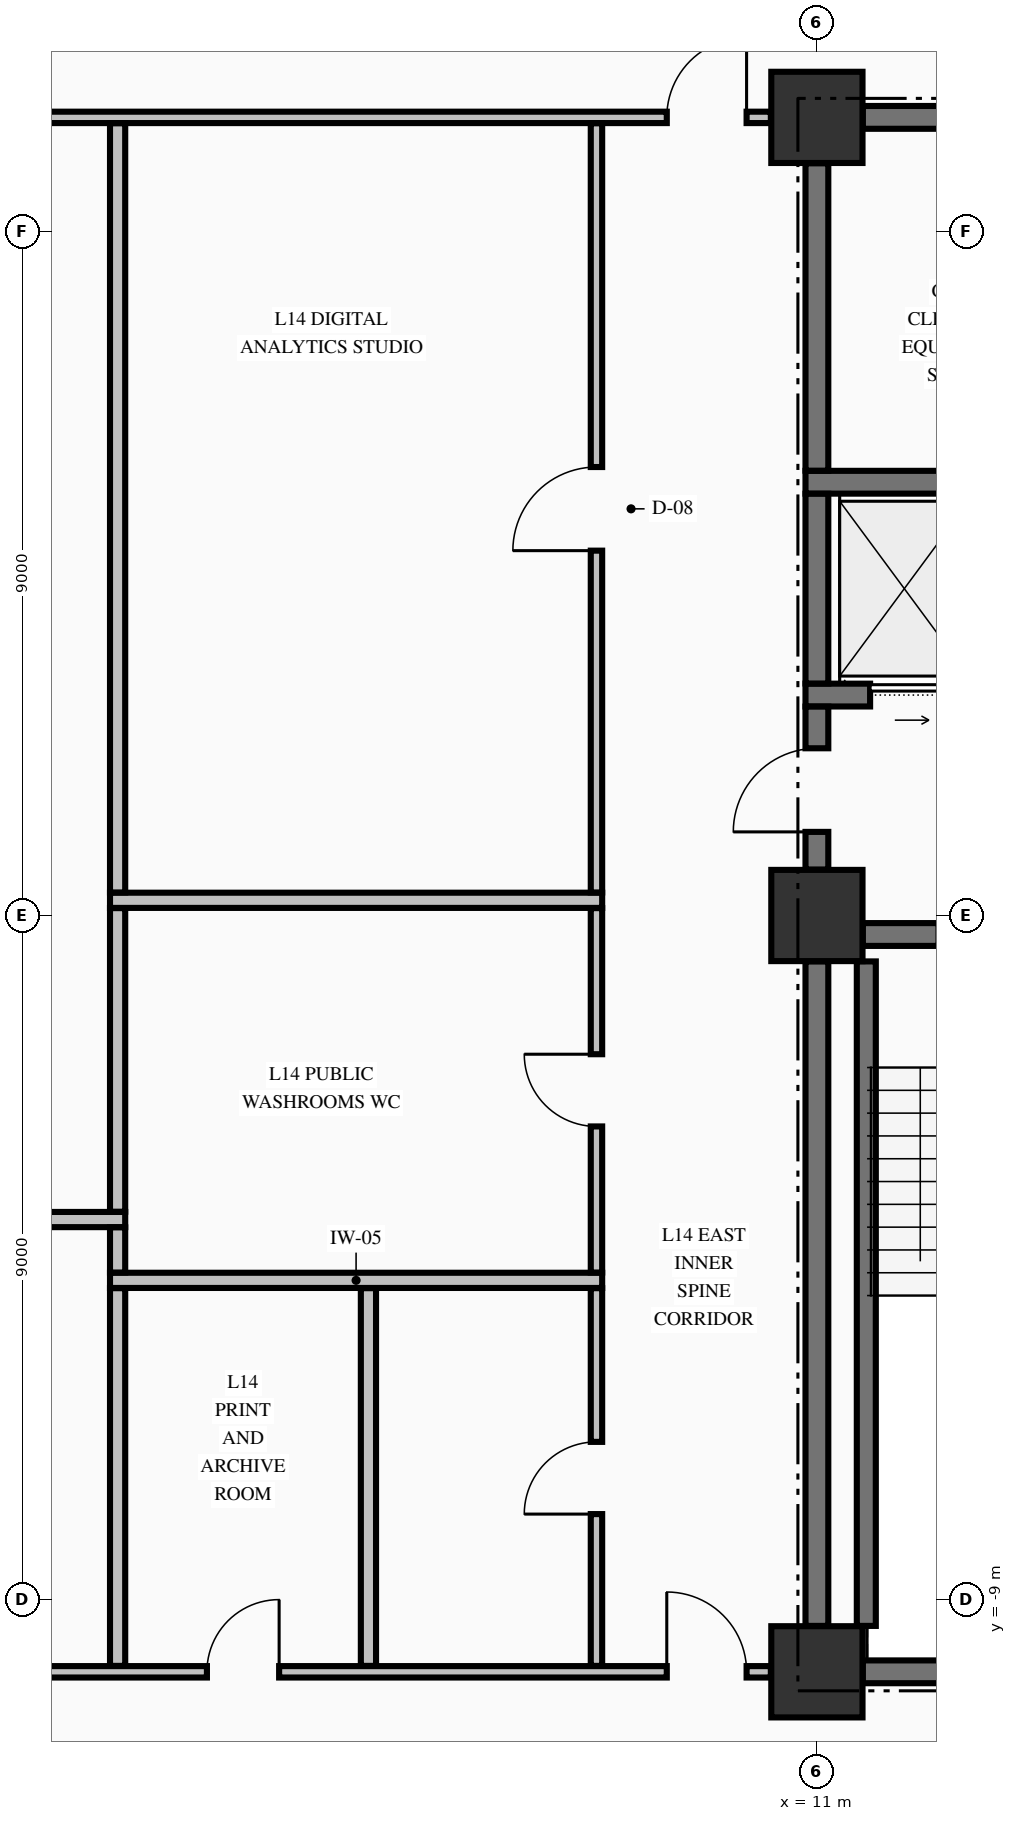
"""IFC4 building model, lengths in metres.
Left out: names, types, materials, properties, quantities, classifications, styles, units other than length and angle.
Written with IfcOpenShell. Run it as: python <this file> out.ifc"""

import sys

from ifc_helpers import new_model, si_unit, direction, frame, frame_2d, origin, origin_2d, place, context, subcontext, project, spatial, rectangle, extrude, element, fill, save


model = new_model("IFC4")
c1 = context("Model", 3, precision=1e-05, world=origin(), true_north=direction((0.0, 1.0)))
c2 = subcontext(c1, "Body", "Model", "MODEL_VIEW")
j1 = project(units=[si_unit("LENGTHUNIT", "METRE"), si_unit("PLANEANGLEUNIT", "RADIAN")], contexts=[c1])
p1 = place(None, origin())
s1 = spatial("IfcSite", under=j1, at=p1, CompositionType="ELEMENT")
p2 = place(p1, origin())
s2 = spatial("IfcBuilding", under=s1, at=p2, CompositionType="ELEMENT")
p3 = place(p2, frame((0.0, 0.0, 60.76)))
s3 = spatial("IfcBuildingStorey", under=s2, at=p3, CompositionType="ELEMENT", Elevation=60.76)
for number, where, z_axis, x_axis in (
    (1, (11.0, -9.95, -0.3), (0.0, 0.0, 1.0), (1.0, 0.0, 0.0)),
    (2, (11.0, 0.0, -0.3), (0.0, 0.0, 1.0), (1.0, 0.0, 0.0)),
    (3, (11.0, 10.5, -0.3), (0.0, 0.0, 1.0), (1.0, 0.0, 0.0)),
):
    element("IfcColumn", number, at=place(p3, frame(where, z_axis=z_axis, x_axis=x_axis)), inside=s3, PredefinedType="COLUMN", context=c2, shape_type="SweptSolid", body=[
        extrude(rectangle(XDim=1.2, YDim=1.2, at=origin_2d()), origin(), (0.0, 0.0, 1.0), 3.62),
    ])
p4 = place(p3, frame((11.604, -9.95, 0.0), z_axis=(0.0, 0.0, 1.0), x_axis=(1.0, 0.0, 0.0)))
e4 = element("IfcWall", 4, at=p4, inside=s3, PredefinedType="SHEAR", context=c2, shape_type="SweptSolid", body=[
    extrude(rectangle(XDim=3.096, YDim=0.3, at=frame_2d((1.548, 0.0))), origin(), (0.0, 0.0, 1.0), 3.32),
])
p5 = place(p3, frame((11.604, -0.25, 0.0), z_axis=(0.0, 0.0, 1.0), x_axis=(1.0, 0.0, 0.0)))
e5 = element("IfcWall", 5, at=p5, inside=s3, PredefinedType="SHEAR", context=c2, shape_type="SweptSolid", body=[
    extrude(rectangle(XDim=3.271, YDim=0.3, at=frame_2d((1.635, 0.0))), origin(), (0.0, 0.0, 1.0), 3.32),
])
p6 = place(p5, frame((0.996, 0.0, 0.0)))
e6 = element("IfcOpeningElement", 6, at=p6, cuts=e5, PredefinedType="OPENING", context=c2, shape_type="SweptSolid", body=[
    extrude(rectangle(XDim=1.1, YDim=2.15, at=frame_2d((0.55, 1.075))), frame((0.0, 0.16, 0.0), z_axis=(0.0, -1.0, 0.0), x_axis=(1.0, 0.0, 0.0)), (0.0, 0.0, 1.0), 0.32),
])
p7 = place(p3, frame((10.85, 2.9, 0.0), z_axis=(0.0, 0.0, 1.0), x_axis=(1.0, 0.0, 0.0)))
e7 = element("IfcWall", 7, at=p7, inside=s3, PredefinedType="SHEAR", context=c2, shape_type="SweptSolid", body=[
    extrude(rectangle(XDim=4.025, YDim=0.3, at=frame_2d((2.012, 0.0))), origin(), (0.0, 0.0, 1.0), 3.32),
])
p8 = place(p7, frame((0.85, 0.0, 0.0)))
e8 = element("IfcOpeningElement", 8, at=p8, cuts=e7, PredefinedType="OPENING", context=c2, shape_type="SweptSolid", body=[
    extrude(rectangle(XDim=1.1, YDim=2.2, at=frame_2d((0.55, 1.1))), frame((0.0, 0.16, 0.0), z_axis=(0.0, -1.0, 0.0), x_axis=(1.0, 0.0, 0.0)), (0.0, 0.0, 1.0), 0.32),
])
p9 = place(p3, frame((10.85, 5.7, 0.0), z_axis=(0.0, 0.0, 1.0), x_axis=(1.0, 0.0, 0.0)))
e9 = element("IfcWall", 9, at=p9, inside=s3, PredefinedType="SHEAR", context=c2, shape_type="SweptSolid", body=[
    extrude(rectangle(XDim=4.025, YDim=0.3, at=frame_2d((2.012, 0.0))), origin(), (0.0, 0.0, 1.0), 3.32),
])
p10 = place(p3, frame((11.604, 10.5, 0.0), z_axis=(0.0, 0.0, 1.0), x_axis=(1.0, 0.0, 0.0)))
e10 = element("IfcWall", 10, at=p10, inside=s3, PredefinedType="SHEAR", context=c2, shape_type="SweptSolid", body=[
    extrude(rectangle(XDim=3.096, YDim=0.3, at=frame_2d((1.548, 0.0))), origin(), (0.0, 0.0, 1.0), 3.32),
])
p11 = place(p10, frame((1.371, 0.0, 0.0)))
e11 = element("IfcOpeningElement", 11, at=p11, cuts=e10, PredefinedType="OPENING", context=c2, shape_type="SweptSolid", body=[
    extrude(rectangle(XDim=0.95, YDim=2.15, at=frame_2d((0.475, 1.075))), frame((0.0, 0.16, 0.0), z_axis=(0.0, -1.0, 0.0), x_axis=(1.0, 0.0, 0.0)), (0.0, 0.0, 1.0), 0.32),
])
p12 = place(p3, frame((-10.394, -9.95, 0.0), z_axis=(0.0, 0.0, 1.0), x_axis=(1.0, 0.0, 0.0)))
e12 = element("IfcWall", 12, at=p12, inside=s3, PredefinedType="PARTITIONING", context=c2, shape_type="SweptSolid", body=[
    extrude(rectangle(XDim=20.788, YDim=0.15, at=frame_2d((10.394, 0.0))), origin(), (0.0, 0.0, 1.0), 3.32),
])
p13 = place(p12, frame((0.319, 0.0, 0.0)))
e13 = element("IfcOpeningElement", 13, at=p13, cuts=e12, PredefinedType="OPENING", context=c2, shape_type="SweptSolid", body=[
    extrude(rectangle(XDim=1.05, YDim=2.15, at=frame_2d((0.525, 1.075))), frame((0.0, 0.085, 0.0), z_axis=(0.0, -1.0, 0.0), x_axis=(1.0, 0.0, 0.0)), (0.0, 0.0, 1.0), 0.17),
])
p14 = place(p12, frame((19.419, 0.0, 0.0)))
e14 = element("IfcOpeningElement", 14, at=p14, cuts=e12, PredefinedType="OPENING", context=c2, shape_type="SweptSolid", body=[
    extrude(rectangle(XDim=1.05, YDim=2.15, at=frame_2d((0.525, 1.075))), frame((0.0, 0.085, 0.0), z_axis=(0.0, -1.0, 0.0), x_axis=(1.0, 0.0, 0.0)), (0.0, 0.0, 1.0), 0.17),
])
p15 = place(p12, frame((13.369, 0.0, 0.0)))
e15 = element("IfcOpeningElement", 15, at=p15, cuts=e12, PredefinedType="OPENING", context=c2, shape_type="SweptSolid", body=[
    extrude(rectangle(XDim=0.95, YDim=2.15, at=frame_2d((0.475, 1.075))), frame((0.0, 0.085, 0.0), z_axis=(0.0, -1.0, 0.0), x_axis=(1.0, 0.0, 0.0)), (0.0, 0.0, 1.0), 0.17),
])
p16 = place(p3, frame((1.7, -4.8, 0.0), z_axis=(0.0, 0.0, 1.0), x_axis=(1.0, 0.0, 0.0)))
e16 = element("IfcWall", 16, at=p16, inside=s3, PredefinedType="PARTITIONING", context=c2, shape_type="SweptSolid", body=[
    extrude(rectangle(XDim=6.475, YDim=0.2, at=frame_2d((3.238, 0.0))), origin(), (0.0, 0.0, 1.0), 3.32),
])
p17 = place(p3, frame((-8.175, -4.0, 0.0), z_axis=(0.0, 0.0, 1.0), x_axis=(1.0, 0.0, 0.0)))
e17 = element("IfcWall", 17, at=p17, inside=s3, PredefinedType="PARTITIONING", context=c2, shape_type="SweptSolid", body=[
    extrude(rectangle(XDim=10.075, YDim=0.2, at=frame_2d((5.038, 0.0))), origin(), (0.0, 0.0, 1.0), 3.32),
])
p18 = place(p3, frame((1.7, 0.2, 0.0), z_axis=(0.0, 0.0, 1.0), x_axis=(1.0, 0.0, 0.0)))
e18 = element("IfcWall", 18, at=p18, inside=s3, PredefinedType="PARTITIONING", context=c2, shape_type="SweptSolid", body=[
    extrude(rectangle(XDim=6.475, YDim=0.2, at=frame_2d((3.238, 0.0))), origin(), (0.0, 0.0, 1.0), 3.32),
])
p19 = place(p3, frame((-10.394, 10.5, 0.0), z_axis=(0.0, 0.0, 1.0), x_axis=(1.0, 0.0, 0.0)))
e19 = element("IfcWall", 19, at=p19, inside=s3, PredefinedType="PARTITIONING", context=c2, shape_type="SweptSolid", body=[
    extrude(rectangle(XDim=20.788, YDim=0.15, at=frame_2d((10.394, 0.0))), origin(), (0.0, 0.0, 1.0), 3.32),
])
p20 = place(p19, frame((0.319, 0.0, 0.0)))
e20 = element("IfcOpeningElement", 20, at=p20, cuts=e19, PredefinedType="OPENING", context=c2, shape_type="SweptSolid", body=[
    extrude(rectangle(XDim=1.05, YDim=2.15, at=frame_2d((0.525, 1.075))), frame((0.0, 0.085, 0.0), z_axis=(0.0, -1.0, 0.0), x_axis=(1.0, 0.0, 0.0)), (0.0, 0.0, 1.0), 0.17),
])
p21 = place(p19, frame((19.419, 0.0, 0.0)))
e21 = element("IfcOpeningElement", 21, at=p21, cuts=e19, PredefinedType="OPENING", context=c2, shape_type="SweptSolid", body=[
    extrude(rectangle(XDim=1.05, YDim=2.15, at=frame_2d((0.525, 1.075))), frame((0.0, 0.085, 0.0), z_axis=(0.0, -1.0, 0.0), x_axis=(1.0, 0.0, 0.0)), (0.0, 0.0, 1.0), 0.17),
])
p22 = place(p3, frame((11.0, -9.346, 0.0), z_axis=(0.0, 0.0, 1.0), x_axis=(0.0, 1.0, 0.0)))
e22 = element("IfcWall", 22, at=p22, inside=s3, PredefinedType="SHEAR", context=c2, shape_type="SweptSolid", body=[
    extrude(rectangle(XDim=8.742, YDim=0.3, at=frame_2d((4.371, 0.0))), origin(), (0.0, 0.0, 1.0), 3.32),
])
p23 = place(p3, frame((11.0, 0.604, 0.0), z_axis=(0.0, 0.0, 1.0), x_axis=(0.0, 1.0, 0.0)))
e23 = element("IfcWall", 23, at=p23, inside=s3, PredefinedType="SHEAR", context=c2, shape_type="SweptSolid", body=[
    extrude(rectangle(XDim=2.144, YDim=0.3, at=frame_2d((1.072, 0.0))), origin(), (0.0, 0.0, 1.0), 3.32),
])
p24 = place(p23, frame((0.496, 0.0, 0.0)))
e24 = element("IfcOpeningElement", 24, at=p24, cuts=e23, PredefinedType="OPENING", context=c2, shape_type="SweptSolid", body=[
    extrude(rectangle(XDim=1.1, YDim=2.15, at=frame_2d((0.55, 1.075))), frame((0.0, 0.16, 0.0), z_axis=(0.0, -1.0, 0.0), x_axis=(1.0, 0.0, 0.0)), (0.0, 0.0, 1.0), 0.32),
])
p25 = place(p3, frame((11.0, 3.052, 0.0), z_axis=(0.0, 0.0, 1.0), x_axis=(0.0, 1.0, 0.0)))
e25 = element("IfcWall", 25, at=p25, inside=s3, PredefinedType="SHEAR", context=c2, shape_type="SweptSolid", body=[
    extrude(rectangle(XDim=2.496, YDim=0.3, at=frame_2d((1.248, 0.0))), origin(), (0.0, 0.0, 1.0), 3.32),
])
p26 = place(p3, frame((11.0, 5.852, 0.0), z_axis=(0.0, 0.0, 1.0), x_axis=(0.0, 1.0, 0.0)))
e26 = element("IfcWall", 26, at=p26, inside=s3, PredefinedType="SHEAR", context=c2, shape_type="SweptSolid", body=[
    extrude(rectangle(XDim=4.044, YDim=0.3, at=frame_2d((2.022, 0.0))), origin(), (0.0, 0.0, 1.0), 3.32),
])
p27 = place(p3, frame((11.65, -9.346, 0.0), z_axis=(0.0, 0.0, 1.0), x_axis=(0.0, 1.0, 0.0)))
e27 = element("IfcWall", 27, at=p27, inside=s3, PredefinedType="SOLIDWALL", context=c2, shape_type="SweptSolid", body=[
    extrude(rectangle(XDim=8.742, YDim=0.25, at=frame_2d((4.371, 0.0))), origin(), (0.0, 0.0, 1.0), 3.32),
])
p28 = place(p3, frame((1.8, -9.872, 0.0), z_axis=(0.0, 0.0, 1.0), x_axis=(0.0, 1.0, 0.0)))
e28 = element("IfcWall", 28, at=p28, inside=s3, PredefinedType="PARTITIONING", context=c2, shape_type="SweptSolid", body=[
    extrude(rectangle(XDim=4.969, YDim=0.2, at=frame_2d((2.484, 0.0))), origin(), (0.0, 0.0, 1.0), 3.32),
])
p29 = place(p3, frame((1.8, -4.697, 0.0), z_axis=(0.0, 0.0, 1.0), x_axis=(0.0, 1.0, 0.0)))
e29 = element("IfcWall", 29, at=p29, inside=s3, PredefinedType="PARTITIONING", context=c2, shape_type="SweptSolid", body=[
    extrude(rectangle(XDim=0.594, YDim=0.2, at=frame_2d((0.297, 0.0))), origin(), (0.0, 0.0, 1.0), 3.32),
])
p30 = place(p3, frame((1.8, -3.897, 0.0), z_axis=(0.0, 0.0, 1.0), x_axis=(0.0, 1.0, 0.0)))
e30 = element("IfcWall", 30, at=p30, inside=s3, PredefinedType="PARTITIONING", context=c2, shape_type="SweptSolid", body=[
    extrude(rectangle(XDim=3.994, YDim=0.2, at=frame_2d((1.997, 0.0))), origin(), (0.0, 0.0, 1.0), 3.32),
])
p31 = place(p3, frame((1.8, 0.303, 0.0), z_axis=(0.0, 0.0, 1.0), x_axis=(0.0, 1.0, 0.0)))
e31 = element("IfcWall", 31, at=p31, inside=s3, PredefinedType="PARTITIONING", context=c2, shape_type="SweptSolid", body=[
    extrude(rectangle(XDim=10.119, YDim=0.2, at=frame_2d((5.06, 0.0))), origin(), (0.0, 0.0, 1.0), 3.32),
])
p32 = place(p3, frame((5.1, -9.872, 0.0), z_axis=(0.0, 0.0, 1.0), x_axis=(0.0, 1.0, 0.0)))
e32 = element("IfcWall", 32, at=p32, inside=s3, PredefinedType="PARTITIONING", context=c2, shape_type="SweptSolid", body=[
    extrude(rectangle(XDim=4.969, YDim=0.2, at=frame_2d((2.484, 0.0))), origin(), (0.0, 0.0, 1.0), 3.32),
])
p33 = place(p3, frame((8.1, -9.872, 0.0), z_axis=(0.0, 0.0, 1.0), x_axis=(0.0, 1.0, 0.0)))
e33 = element("IfcWall", 33, at=p33, inside=s3, PredefinedType="PARTITIONING", context=c2, shape_type="SweptSolid", body=[
    extrude(rectangle(XDim=4.969, YDim=0.15, at=frame_2d((2.484, 0.0))), origin(), (0.0, 0.0, 1.0), 3.32),
])
p34 = place(p33, frame((1.997, 0.0, 0.0)))
e34 = element("IfcOpeningElement", 34, at=p34, cuts=e33, PredefinedType="OPENING", context=c2, shape_type="SweptSolid", body=[
    extrude(rectangle(XDim=0.95, YDim=2.15, at=frame_2d((0.475, 1.075))), frame((0.0, 0.085, 0.0), z_axis=(0.0, -1.0, 0.0), x_axis=(1.0, 0.0, 0.0)), (0.0, 0.0, 1.0), 0.17),
])
p35 = place(p3, frame((8.1, -4.697, 0.0), z_axis=(0.0, 0.0, 1.0), x_axis=(0.0, 1.0, 0.0)))
e35 = element("IfcWall", 35, at=p35, inside=s3, PredefinedType="PARTITIONING", context=c2, shape_type="SweptSolid", body=[
    extrude(rectangle(XDim=4.794, YDim=0.15, at=frame_2d((2.397, 0.0))), origin(), (0.0, 0.0, 1.0), 3.32),
])
p36 = place(p35, frame((1.922, 0.0, 0.0)))
e36 = element("IfcOpeningElement", 36, at=p36, cuts=e35, PredefinedType="OPENING", context=c2, shape_type="SweptSolid", body=[
    extrude(rectangle(XDim=0.95, YDim=2.15, at=frame_2d((0.475, 1.075))), frame((0.0, 0.085, 0.0), z_axis=(0.0, -1.0, 0.0), x_axis=(1.0, 0.0, 0.0)), (0.0, 0.0, 1.0), 0.17),
])
p37 = place(p3, frame((8.1, 0.303, 0.0), z_axis=(0.0, 0.0, 1.0), x_axis=(0.0, 1.0, 0.0)))
e37 = element("IfcWall", 37, at=p37, inside=s3, PredefinedType="PARTITIONING", context=c2, shape_type="SweptSolid", body=[
    extrude(rectangle(XDim=10.119, YDim=0.15, at=frame_2d((5.06, 0.0))), origin(), (0.0, 0.0, 1.0), 3.32),
])
p38 = place(p37, frame((4.497, 0.0, 0.0)))
e38 = element("IfcOpeningElement", 38, at=p38, cuts=e37, PredefinedType="OPENING", context=c2, shape_type="SweptSolid", body=[
    extrude(rectangle(XDim=1.1, YDim=2.15, at=frame_2d((0.55, 1.075))), frame((0.0, 0.085, 0.0), z_axis=(0.0, -1.0, 0.0), x_axis=(1.0, 0.0, 0.0)), (0.0, 0.0, 1.0), 0.17),
])
p39 = place(p24, origin())
e39 = element("IfcDoor", 39, at=p39, inside=s3, OperationType="SINGLE_SWING_LEFT", PredefinedType="DOOR", context=c2, shape_type="SweptSolid", body=[
    extrude(rectangle(XDim=1.1, YDim=2.15, at=frame_2d((0.55, 1.075))), frame((0.0, 0.025, 0.0), z_axis=(0.0, -1.0, 0.0), x_axis=(1.0, 0.0, 0.0)), (0.0, 0.0, 1.0), 0.05),
])
fill(e24, e39)
p40 = place(p8, origin())
e40 = element("IfcDoor", 40, at=p40, inside=s3, OperationType="SLIDING_TO_RIGHT", PredefinedType="DOOR", context=c2, shape_type="SweptSolid", body=[
    extrude(rectangle(XDim=1.1, YDim=2.2, at=frame_2d((0.55, 1.1))), frame((0.0, 0.025, 0.0), z_axis=(0.0, -1.0, 0.0), x_axis=(1.0, 0.0, 0.0)), (0.0, 0.0, 1.0), 0.05),
])
fill(e8, e40)
p41 = place(p21, origin())
e41 = element("IfcDoor", 41, at=p41, inside=s3, OperationType="SINGLE_SWING_RIGHT", PredefinedType="DOOR", context=c2, shape_type="SweptSolid", body=[
    extrude(rectangle(XDim=1.05, YDim=2.15, at=frame_2d((0.525, 1.075))), frame((0.0, 0.025, 0.0), z_axis=(0.0, -1.0, 0.0), x_axis=(1.0, 0.0, 0.0)), (0.0, 0.0, 1.0), 0.05),
])
fill(e21, e41)
p42 = place(p14, origin())
e42 = element("IfcDoor", 42, at=p42, inside=s3, OperationType="SINGLE_SWING_LEFT", PredefinedType="DOOR", context=c2, shape_type="SweptSolid", body=[
    extrude(rectangle(XDim=1.05, YDim=2.15, at=frame_2d((0.525, 1.075))), frame((0.0, 0.025, 0.0), z_axis=(0.0, -1.0, 0.0), x_axis=(1.0, 0.0, 0.0)), (0.0, 0.0, 1.0), 0.05),
])
fill(e14, e42)
p43 = place(p38, origin())
e43 = element("IfcDoor", 43, at=p43, inside=s3, OperationType="SINGLE_SWING_LEFT", PredefinedType="DOOR", context=c2, shape_type="SweptSolid", body=[
    extrude(rectangle(XDim=1.1, YDim=2.15, at=frame_2d((0.55, 1.075))), frame((0.0, 0.025, 0.0), z_axis=(0.0, -1.0, 0.0), x_axis=(1.0, 0.0, 0.0)), (0.0, 0.0, 1.0), 0.05),
])
fill(e38, e43)
p44 = place(p36, origin())
e44 = element("IfcDoor", 44, at=p44, inside=s3, OperationType="SINGLE_SWING_RIGHT", PredefinedType="DOOR", context=c2, shape_type="SweptSolid", body=[
    extrude(rectangle(XDim=0.95, YDim=2.15, at=frame_2d((0.475, 1.075))), frame((0.0, 0.025, 0.0), z_axis=(0.0, -1.0, 0.0), x_axis=(1.0, 0.0, 0.0)), (0.0, 0.0, 1.0), 0.05),
])
fill(e36, e44)
p45 = place(p34, origin())
e45 = element("IfcDoor", 45, at=p45, inside=s3, OperationType="SINGLE_SWING_LEFT", PredefinedType="DOOR", context=c2, shape_type="SweptSolid", body=[
    extrude(rectangle(XDim=0.95, YDim=2.15, at=frame_2d((0.475, 1.075))), frame((0.0, 0.025, 0.0), z_axis=(0.0, -1.0, 0.0), x_axis=(1.0, 0.0, 0.0)), (0.0, 0.0, 1.0), 0.05),
])
fill(e34, e45)
p46 = place(p15, origin())
e46 = element("IfcDoor", 46, at=p46, inside=s3, OperationType="SINGLE_SWING_RIGHT", PredefinedType="DOOR", context=c2, shape_type="SweptSolid", body=[
    extrude(rectangle(XDim=0.95, YDim=2.15, at=frame_2d((0.475, 1.075))), frame((0.0, 0.025, 0.0), z_axis=(0.0, -1.0, 0.0), x_axis=(1.0, 0.0, 0.0)), (0.0, 0.0, 1.0), 0.05),
])
fill(e15, e46)
save(model, sys.argv[1])
